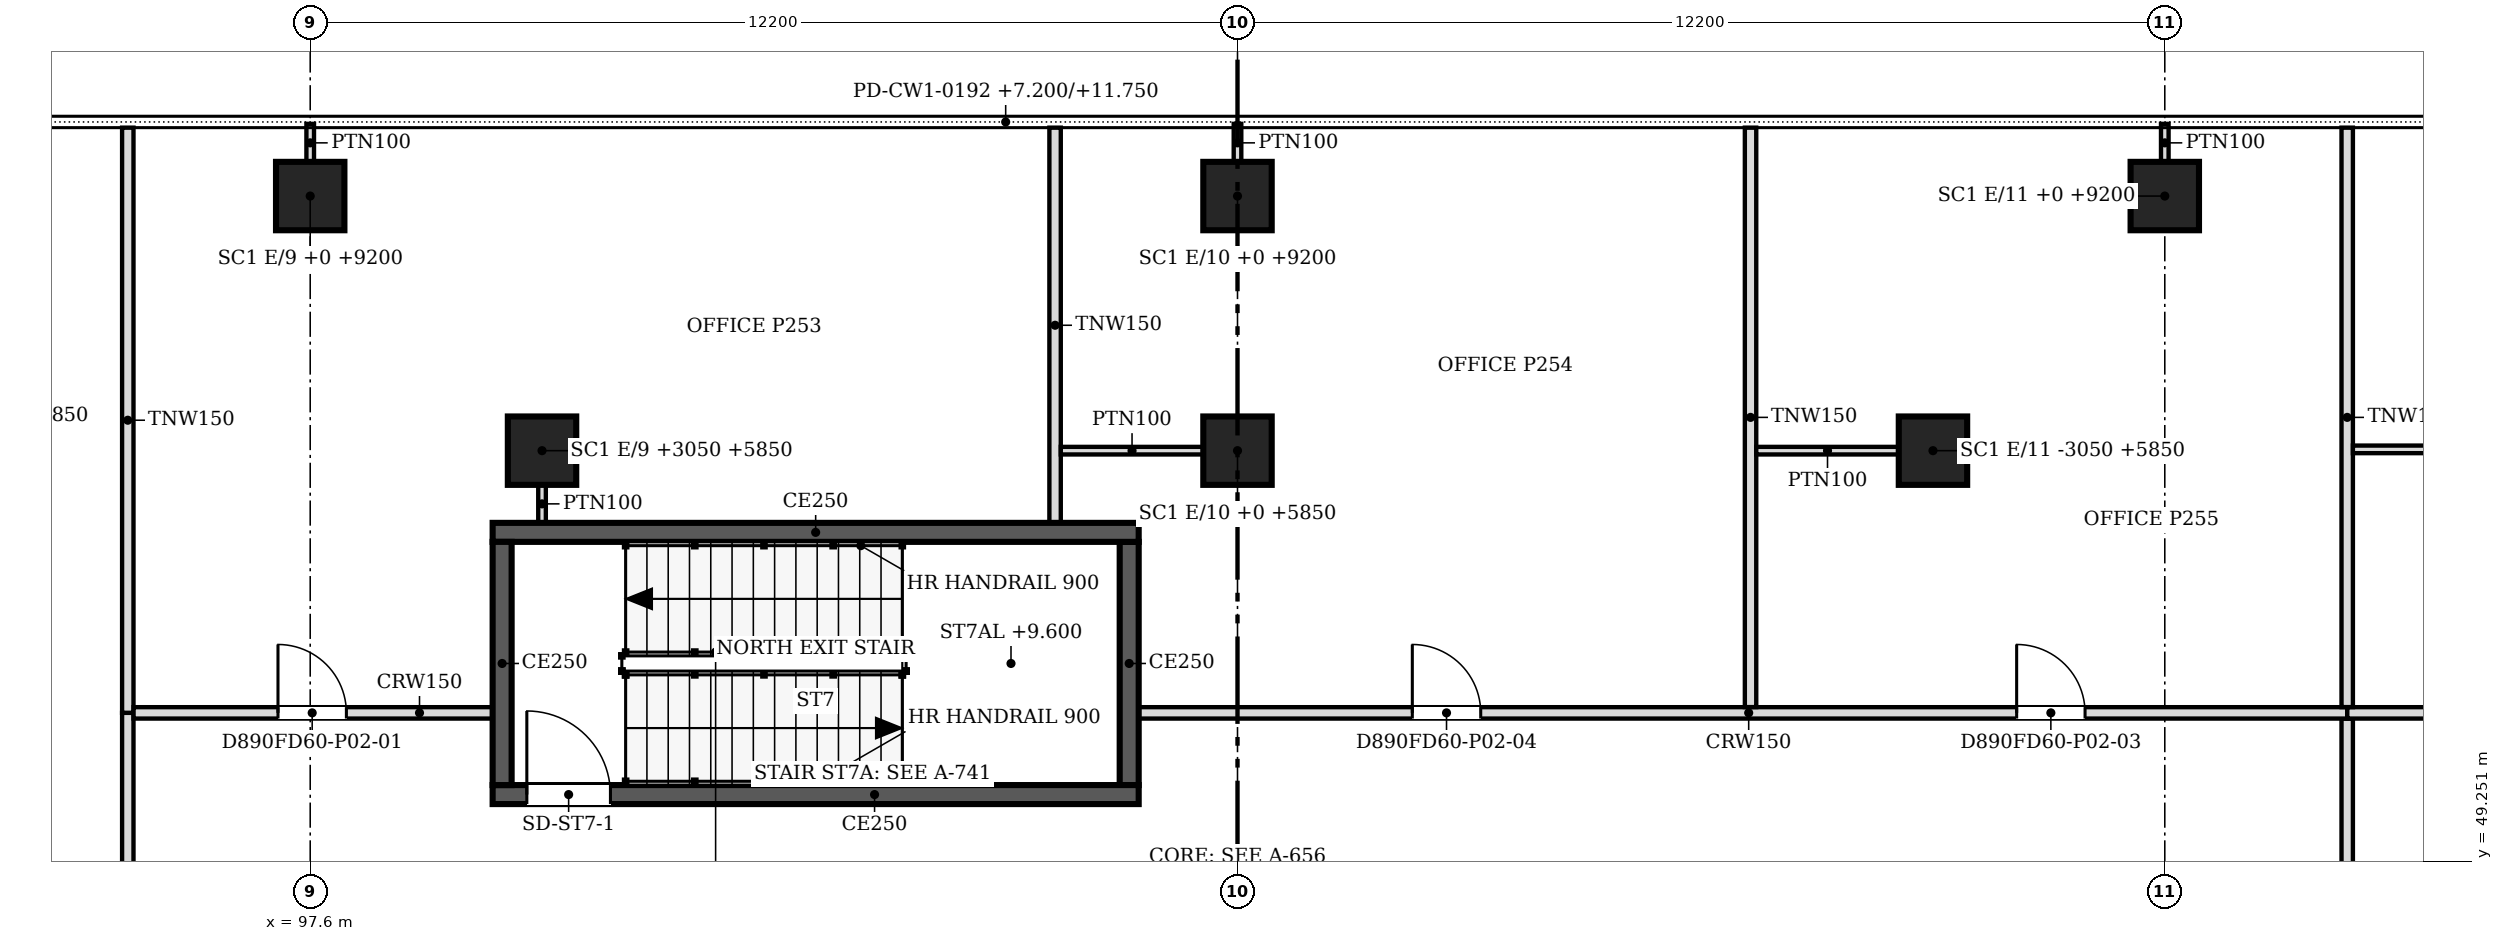
"""IFC4 building model, lengths in metres.
Left out: names, types, materials, properties, quantities, classifications, styles, units other than length and angle.
Written with IfcOpenShell. Run it as: python <this file> out.ifc"""

import sys

from ifc_helpers import new_model, si_unit, direction, frame, frame_2d, origin, origin_2d, place, context, subcontext, project, spatial, rectangle, extrude, source, transform, mapped, element, fill, save


model = new_model("IFC4")
c1 = context("Model", 3, precision=1e-05, world=origin(), true_north=direction((0.0, 1.0)))
c2 = subcontext(c1, "Body", "Model", "MODEL_VIEW")
j1 = project(units=[si_unit("LENGTHUNIT", "METRE"), si_unit("PLANEANGLEUNIT", "RADIAN")], contexts=[c1])
p1 = place(None, origin())
s1 = spatial("IfcSite", under=j1, at=p1, CompositionType="ELEMENT")
p2 = place(p1, origin())
s2 = spatial("IfcBuilding", under=s1, at=p2, CompositionType="ELEMENT")
p3 = place(p2, frame((0.0, 0.0, 7.2)))
s3 = spatial("IfcBuildingStorey", under=s2, at=p3, CompositionType="ELEMENT", Elevation=7.2)
for number, where, z_axis, x_axis in (
    (1, (118.95, 54.65, 0.0), (0.0, 0.0, 1.0), (1.0, 0.0, 0.0)),
    (2, (109.8, 54.65, 0.0), (0.0, 0.0, 1.0), (1.0, 0.0, 0.0)),
    (3, (100.65, 54.65, 0.0), (0.0, 0.0, 1.0), (1.0, 0.0, 0.0)),
    (4, (97.6, 58.0, 0.0), (0.0, 0.0, 1.0), (1.0, 0.0, 0.0)),
    (5, (109.8, 58.0, 0.0), (0.0, 0.0, 1.0), (1.0, 0.0, 0.0)),
    (6, (122.0, 58.0, 0.0), (0.0, 0.0, 1.0), (1.0, 0.0, 0.0)),
):
    element("IfcColumn", number, at=place(p3, frame(where, z_axis=z_axis, x_axis=x_axis)), inside=s3, PredefinedType="COLUMN", context=c2, shape_type="SweptSolid", body=[
        extrude(rectangle(XDim=0.9, YDim=0.9, at=origin_2d()), origin(), (0.0, 0.0, 1.0), 4.55),
    ])
p4 = place(p3, frame((108.5, 50.125, 0.0), z_axis=(0.0, 0.0, 1.0), x_axis=(-1.0, 0.0, 0.0)))
e7 = element("IfcWall", 7, at=p4, inside=s3, PredefinedType="SOLIDWALL", context=c2, shape_type="SweptSolid", body=[
    extrude(rectangle(XDim=8.5, YDim=0.25, at=frame_2d((4.25, 0.0))), origin(), (0.0, 0.0, 1.0), 4.8),
])
m1 = source(origin(), c2, "Body", "SweptSolid", [
    extrude(rectangle(XDim=1.1, YDim=2.1, at=frame_2d((0.55, 1.05))), frame((0.0, 0.135, 0.0), z_axis=(0.0, -1.0, 0.0), x_axis=(1.0, 0.0, 0.0)), (0.0, 0.0, 1.0), 0.27),
])
p5 = place(p4, frame((6.95, 0.0, 0.0)))
e8 = element("IfcOpeningElement", 8, at=p5, cuts=e7, PredefinedType="OPENING", context=c2, shape_type="MappedRepresentation", body=[
    mapped(m1, transform((0.0, 0.0, 0.0), scale=1.0)),
])
p6 = place(p3, frame((100.125, 50.25, 0.0), z_axis=(0.0, 0.0, 1.0), x_axis=(0.0, 1.0, 0.0)))
e9 = element("IfcWall", 9, at=p6, inside=s3, PredefinedType="SOLIDWALL", context=c2, shape_type="SweptSolid", body=[
    extrude(rectangle(XDim=3.2, YDim=0.25, at=frame_2d((1.6, 0.0))), origin(), (0.0, 0.0, 1.0), 4.8),
])
p7 = place(p3, frame((100.0, 53.575, 0.0), z_axis=(0.0, 0.0, 1.0), x_axis=(1.0, 0.0, 0.0)))
e10 = element("IfcWall", 10, at=p7, inside=s3, PredefinedType="SOLIDWALL", context=c2, shape_type="SweptSolid", body=[
    extrude(rectangle(XDim=8.5, YDim=0.25, at=frame_2d((4.25, 0.0))), origin(), (0.0, 0.0, 1.0), 4.8),
])
p8 = place(p3, frame((108.375, 53.45, 0.0), z_axis=(0.0, 0.0, 1.0), x_axis=(0.0, -1.0, 0.0)))
e11 = element("IfcWall", 11, at=p8, inside=s3, PredefinedType="SOLIDWALL", context=c2, shape_type="SweptSolid", body=[
    extrude(rectangle(XDim=3.2, YDim=0.25, at=frame_2d((1.6, 0.0))), origin(), (0.0, 0.0, 1.0), 4.8),
])
p9 = place(p3, frame((95.2, 36.6, 0.0), z_axis=(0.0, 0.0, 1.0), x_axis=(0.0, 1.0, 0.0)))
e12 = element("IfcWall", 12, at=p9, inside=s3, PredefinedType="PARTITIONING", context=c2, shape_type="SweptSolid", body=[
    extrude(rectangle(XDim=14.6, YDim=0.15, at=frame_2d((7.3, 0.0))), origin(), (0.0, 0.0, 1.0), 3.715),
])
m2 = source(origin(), c2, "Body", "SweptSolid", [
    extrude(rectangle(XDim=1.0, YDim=2.1, at=frame_2d((0.5, 1.05))), frame((0.0, 0.085, 0.0), z_axis=(0.0, -1.0, 0.0), x_axis=(1.0, 0.0, 0.0)), (0.0, 0.0, 1.0), 0.17),
])
p10 = place(p9, frame((11.301, 0.0, 0.0)))
e13 = element("IfcOpeningElement", 13, at=p10, cuts=e12, PredefinedType="OPENING", context=c2, shape_type="MappedRepresentation", body=[
    mapped(m2, transform((0.0, 0.0, 0.0), scale=1.0)),
])
p11 = place(p9, frame((4.0, 0.0, 0.0)))
e14 = element("IfcOpeningElement", 14, at=p11, cuts=e12, PredefinedType="OPENING", context=c2, shape_type="MappedRepresentation", body=[
    mapped(m2, transform((0.0, 0.0, 0.0), scale=1.0)),
])
p12 = place(p3, frame((124.4, 51.124, 0.0), z_axis=(0.0, 0.0, 1.0), x_axis=(0.0, -1.0, 0.0)))
e15 = element("IfcWall", 15, at=p12, inside=s3, PredefinedType="PARTITIONING", context=c2, shape_type="SweptSolid", body=[
    extrude(rectangle(XDim=14.524, YDim=0.15, at=frame_2d((7.262, 0.0))), origin(), (0.0, 0.0, 1.0), 3.715),
])
p13 = place(p12, frame((2.223, 0.0, 0.0)))
e16 = element("IfcOpeningElement", 16, at=p13, cuts=e15, PredefinedType="OPENING", context=c2, shape_type="MappedRepresentation", body=[
    mapped(m2, transform((0.0, 0.0, 0.0), scale=1.0)),
])
p14 = place(p3, frame((95.2, 51.201, 0.0), z_axis=(0.0, 0.0, 1.0), x_axis=(0.0, 1.0, 0.0)))
e17 = element("IfcWall", 17, at=p14, inside=s3, PredefinedType="PARTITIONING", context=c2, shape_type="SweptSolid", body=[
    extrude(rectangle(XDim=7.699, YDim=0.15, at=frame_2d((3.85, 0.0))), origin(), (0.0, 0.0, 1.0), 3.715),
])
p15 = place(p3, frame((95.276, 51.2, 0.0), z_axis=(0.0, 0.0, 1.0), x_axis=(1.0, 0.0, 0.0)))
e18 = element("IfcWall", 18, at=p15, inside=s3, PredefinedType="PARTITIONING", context=c2, shape_type="SweptSolid", body=[
    extrude(rectangle(XDim=4.724, YDim=0.15, at=frame_2d((2.362, 0.0))), origin(), (0.0, 0.0, 1.0), 3.715),
])
m3 = source(origin(), c2, "Body", "SweptSolid", [
    extrude(rectangle(XDim=0.9, YDim=2.1, at=frame_2d((0.45, 1.05))), frame((0.0, 0.085, 0.0), z_axis=(0.0, -1.0, 0.0), x_axis=(1.0, 0.0, 0.0)), (0.0, 0.0, 1.0), 0.17),
])
p16 = place(p15, frame((1.9, 0.0, 0.0)))
e19 = element("IfcOpeningElement", 19, at=p16, cuts=e18, PredefinedType="OPENING", context=c2, shape_type="MappedRepresentation", body=[
    mapped(m3, transform((0.0, 0.0, 0.0), scale=1.0)),
])
p17 = place(p3, frame((108.5, 51.2, 0.0), z_axis=(0.0, 0.0, 1.0), x_axis=(1.0, 0.0, 0.0)))
e20 = element("IfcWall", 20, at=p17, inside=s3, PredefinedType="PARTITIONING", context=c2, shape_type="SweptSolid", body=[
    extrude(rectangle(XDim=15.9, YDim=0.15, at=frame_2d((7.95, 0.0))), origin(), (0.0, 0.0, 1.0), 3.715),
])
p18 = place(p17, frame((11.551, 0.0, 0.0)))
e21 = element("IfcOpeningElement", 21, at=p18, cuts=e20, PredefinedType="OPENING", context=c2, shape_type="MappedRepresentation", body=[
    mapped(m3, transform((0.0, 0.0, 0.0), scale=1.0)),
])
p19 = place(p17, frame((3.6, 0.0, 0.0)))
e22 = element("IfcOpeningElement", 22, at=p19, cuts=e20, PredefinedType="OPENING", context=c2, shape_type="MappedRepresentation", body=[
    mapped(m3, transform((0.0, 0.0, 0.0), scale=1.0)),
])
p20 = place(p3, frame((124.401, 51.2, 0.0), z_axis=(0.0, 0.0, 1.0), x_axis=(1.0, 0.0, 0.0)))
e23 = element("IfcWall", 23, at=p20, inside=s3, PredefinedType="PARTITIONING", context=c2, shape_type="SweptSolid", body=[
    extrude(rectangle(XDim=3.198, YDim=0.15, at=frame_2d((1.599, 0.0))), origin(), (0.0, 0.0, 1.0), 3.715),
])
for number, where, z_axis, x_axis in (
    (24, (116.55, 51.276, 0.0), (0.0, 0.0, 1.0), (0.0, 1.0, 0.0)),
    (25, (124.4, 51.276, 0.0), (0.0, 0.0, 1.0), (0.0, 1.0, 0.0)),
):
    element("IfcWall", number, at=place(p3, frame(where, z_axis=z_axis, x_axis=x_axis)), inside=s3, PredefinedType="PARTITIONING", context=c2, shape_type="SweptSolid", body=[
        extrude(rectangle(XDim=7.624, YDim=0.15, at=frame_2d((3.812, 0.0))), origin(), (0.0, 0.0, 1.0), 3.715),
    ])
p21 = place(p3, frame((107.4, 53.7, 0.0), z_axis=(0.0, 0.0, 1.0), x_axis=(0.0, 1.0, 0.0)))
e26 = element("IfcWall", 26, at=p21, inside=s3, PredefinedType="PARTITIONING", context=c2, shape_type="SweptSolid", body=[
    extrude(rectangle(XDim=5.2, YDim=0.15, at=frame_2d((2.6, 0.0))), origin(), (0.0, 0.0, 1.0), 3.715),
])
p22 = place(p3, frame((100.65, 54.2, 0.0), z_axis=(0.0, 0.0, 1.0), x_axis=(0.0, -1.0, 0.0)))
e27 = element("IfcWall", 27, at=p22, inside=s3, PredefinedType="PARTITIONING", context=c2, shape_type="SweptSolid", body=[
    extrude(rectangle(XDim=0.5, YDim=0.1, at=frame_2d((0.25, 0.0))), origin(), (0.0, 0.0, 1.0), 3.715),
])
for number, where, z_axis, x_axis in (
    (28, (109.35, 54.65, 0.0), (0.0, 0.0, 1.0), (-1.0, 0.0, 0.0)),
    (29, (118.5, 54.65, 0.0), (0.0, 0.0, 1.0), (-1.0, 0.0, 0.0)),
):
    element("IfcWall", number, at=place(p3, frame(where, z_axis=z_axis, x_axis=x_axis)), inside=s3, PredefinedType="PARTITIONING", context=c2, shape_type="SweptSolid", body=[
        extrude(rectangle(XDim=1.875, YDim=0.1, at=frame_2d((0.938, 0.0))), origin(), (0.0, 0.0, 1.0), 3.715),
    ])
p23 = place(p3, frame((127.56, 54.667, 0.0), z_axis=(0.0, 0.0, 1.0), x_axis=(-1.0, 0.0, 0.0)))
e30 = element("IfcWall", 30, at=p23, inside=s3, PredefinedType="PARTITIONING", context=c2, shape_type="SweptSolid", body=[
    extrude(rectangle(XDim=3.085, YDim=0.1, at=frame_2d((1.542, 0.0))), origin(), (0.0, 0.0, 1.0), 3.715),
])
for number, where, z_axis, x_axis in (
    (31, (97.6, 58.45, 0.0), (0.0, 0.0, 1.0), (0.0, 1.0, 0.0)),
    (32, (109.8, 58.45, 0.0), (0.0, 0.0, 1.0), (0.0, 1.0, 0.0)),
    (33, (122.0, 58.45, 0.0), (0.0, 0.0, 1.0), (0.0, 1.0, 0.0)),
):
    element("IfcWall", number, at=place(p3, frame(where, z_axis=z_axis, x_axis=x_axis)), inside=s3, PredefinedType="PARTITIONING", context=c2, shape_type="SweptSolid", body=[
        extrude(rectangle(XDim=0.5, YDim=0.1, at=frame_2d((0.25, 0.0))), origin(), (0.0, 0.0, 1.0), 3.715),
    ])
m4 = source(origin(), c2, "Body", "SweptSolid", [
    extrude(rectangle(XDim=1.1, YDim=2.1, at=frame_2d((0.55, 1.05))), frame((0.0, 0.025, 0.0), z_axis=(0.0, -1.0, 0.0), x_axis=(1.0, 0.0, 0.0)), (0.0, 0.0, 1.0), 0.05),
])
p24 = place(p5, origin())
e34 = element("IfcDoor", 34, at=p24, inside=s3, OperationType="SINGLE_SWING_RIGHT", PredefinedType="DOOR", context=c2, shape_type="MappedRepresentation", body=[
    mapped(m4, transform((0.0, 0.0, 0.0), scale=1.0)),
])
fill(e8, e34)
m5 = source(origin(), c2, "Body", "SweptSolid", [
    extrude(rectangle(XDim=0.9, YDim=2.1, at=frame_2d((0.45, 1.05))), frame((0.0, 0.025, 0.0), z_axis=(0.0, -1.0, 0.0), x_axis=(1.0, 0.0, 0.0)), (0.0, 0.0, 1.0), 0.05),
])
p25 = place(p16, origin())
e35 = element("IfcDoor", 35, at=p25, inside=s3, OperationType="SINGLE_SWING_LEFT", PredefinedType="DOOR", context=c2, shape_type="MappedRepresentation", body=[
    mapped(m5, transform((0.0, 0.0, 0.0), scale=1.0)),
])
fill(e19, e35)
p26 = place(p18, origin())
e36 = element("IfcDoor", 36, at=p26, inside=s3, OperationType="SINGLE_SWING_LEFT", PredefinedType="DOOR", context=c2, shape_type="MappedRepresentation", body=[
    mapped(m5, transform((0.0, 0.0, 0.0), scale=1.0)),
])
fill(e21, e36)
p27 = place(p19, origin())
e37 = element("IfcDoor", 37, at=p27, inside=s3, OperationType="SINGLE_SWING_LEFT", PredefinedType="DOOR", context=c2, shape_type="MappedRepresentation", body=[
    mapped(m5, transform((0.0, 0.0, 0.0), scale=1.0)),
])
fill(e22, e37)
save(model, sys.argv[1])
